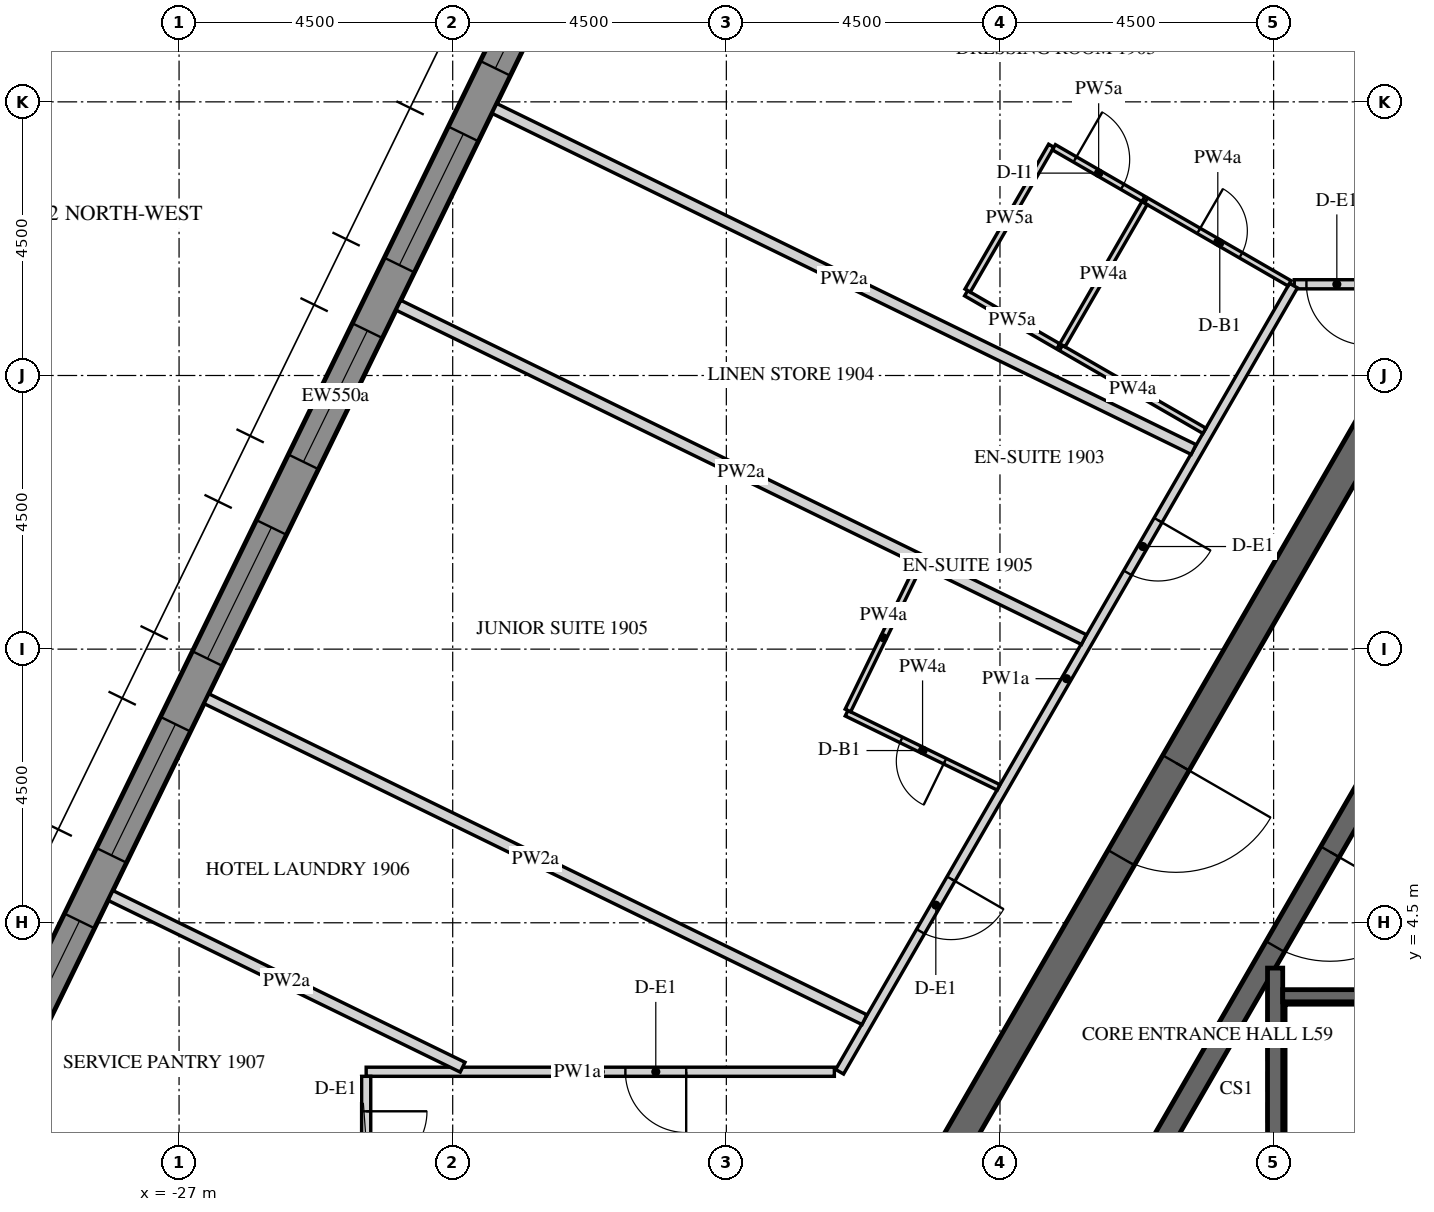
"""IFC4 building model, lengths in metres.
Left out: names, types, materials, properties, quantities, classifications, styles, units other than length and angle.
Written with IfcOpenShell. Run it as: python <this file> out.ifc"""

import sys

from ifc_helpers import new_model, si_unit, direction, frame, frame_2d, origin, place, context, subcontext, project, spatial, polyline, rectangle, outline, extrude, element, fill, save


model = new_model("IFC4")
c1 = context("Model", 3, precision=1e-05, world=origin(), true_north=direction((0.0, 1.0)))
c2 = subcontext(c1, "Body", "Model", "MODEL_VIEW")
j1 = project(units=[si_unit("LENGTHUNIT", "METRE"), si_unit("PLANEANGLEUNIT", "RADIAN")], contexts=[c1])
p1 = place(None, origin())
s1 = spatial("IfcSite", under=j1, at=p1, CompositionType="ELEMENT")
p2 = place(p1, origin())
s2 = spatial("IfcBuilding", under=s1, at=p2, CompositionType="ELEMENT")
p3 = place(p2, frame((0.0, 0.0, 246.3)))
s3 = spatial("IfcBuildingStorey", under=s2, at=p3, CompositionType="ELEMENT", Elevation=246.3)
p4 = place(p3, frame((-18.345, 25.633, -0.15), z_axis=(0.0, 0.0, 1.0), x_axis=(-0.43837181828, -0.898793718791, 0.0)))
e1 = element("IfcWall", 1, at=p4, inside=s3, PredefinedType="SOLIDWALL", context=c2, shape_type="SweptSolid", body=[
    extrude(outline(polyline([(-0.026, -0.275), (27.78, -0.275), (27.735, 0.275), (0.026, 0.275), (-0.026, -0.275)])), origin(), (0.0, 0.0, 1.0), 3.75),
])
p5 = place(p4, frame((1.879, 0.0, 1.05)))
e2 = element("IfcOpeningElement", 2, at=p5, cuts=e1, PredefinedType="OPENING", context=c2, shape_type="SweptSolid", body=[
    extrude(rectangle(XDim=2.4, YDim=2.4, at=frame_2d((1.2, 1.2))), frame((0.0, 0.285, 0.0), z_axis=(0.0, -1.0, 0.0), x_axis=(1.0, 0.0, 0.0)), (0.0, 0.0, 1.0), 0.57),
])
p6 = place(p4, frame((5.479, 0.0, 1.05)))
e3 = element("IfcOpeningElement", 3, at=p6, cuts=e1, PredefinedType="OPENING", context=c2, shape_type="SweptSolid", body=[
    extrude(rectangle(XDim=2.4, YDim=2.4, at=frame_2d((1.2, 1.2))), frame((0.0, 0.285, 0.0), z_axis=(0.0, -1.0, 0.0), x_axis=(1.0, 0.0, 0.0)), (0.0, 0.0, 1.0), 0.57),
])
p7 = place(p4, frame((9.079, 0.0, 1.05)))
e4 = element("IfcOpeningElement", 4, at=p7, cuts=e1, PredefinedType="OPENING", context=c2, shape_type="SweptSolid", body=[
    extrude(rectangle(XDim=2.4, YDim=2.4, at=frame_2d((1.2, 1.2))), frame((0.0, 0.285, 0.0), z_axis=(0.0, -1.0, 0.0), x_axis=(1.0, 0.0, 0.0)), (0.0, 0.0, 1.0), 0.57),
])
p8 = place(p4, frame((12.679, 0.0, 1.05)))
e5 = element("IfcOpeningElement", 5, at=p8, cuts=e1, PredefinedType="OPENING", context=c2, shape_type="SweptSolid", body=[
    extrude(rectangle(XDim=2.4, YDim=2.4, at=frame_2d((1.2, 1.2))), frame((0.0, 0.285, 0.0), z_axis=(0.0, -1.0, 0.0), x_axis=(1.0, 0.0, 0.0)), (0.0, 0.0, 1.0), 0.57),
])
p9 = place(p4, frame((16.279, 0.0, 1.05)))
e6 = element("IfcOpeningElement", 6, at=p9, cuts=e1, PredefinedType="OPENING", context=c2, shape_type="SweptSolid", body=[
    extrude(rectangle(XDim=2.4, YDim=2.4, at=frame_2d((1.2, 1.2))), frame((0.0, 0.285, 0.0), z_axis=(0.0, -1.0, 0.0), x_axis=(1.0, 0.0, 0.0)), (0.0, 0.0, 1.0), 0.57),
])
p10 = place(p4, frame((19.879, 0.0, 1.05)))
e7 = element("IfcOpeningElement", 7, at=p10, cuts=e1, PredefinedType="OPENING", context=c2, shape_type="SweptSolid", body=[
    extrude(rectangle(XDim=2.4, YDim=2.4, at=frame_2d((1.2, 1.2))), frame((0.0, 0.285, 0.0), z_axis=(0.0, -1.0, 0.0), x_axis=(1.0, 0.0, 0.0)), (0.0, 0.0, 1.0), 0.57),
])
p11 = place(p4, frame((23.479, 0.0, 1.05)))
e8 = element("IfcOpeningElement", 8, at=p11, cuts=e1, PredefinedType="OPENING", context=c2, shape_type="SweptSolid", body=[
    extrude(rectangle(XDim=2.4, YDim=2.4, at=frame_2d((1.2, 1.2))), frame((0.0, 0.285, 0.0), z_axis=(0.0, -1.0, 0.0), x_axis=(1.0, 0.0, 0.0)), (0.0, 0.0, 1.0), 0.57),
])
p12 = place(p3, frame((-7.361, 12.75, -0.15), z_axis=(0.0, 0.0, 1.0), x_axis=(-0.50000571537, -0.866022103989, 0.0)))
e9 = element("IfcWall", 9, at=p12, inside=s3, PredefinedType="SHEAR", context=c2, shape_type="SweptSolid", body=[
    extrude(outline(polyline([(-0.144, -0.25), (14.867, -0.25), (14.578, 0.25), (0.144, 0.25), (-0.144, -0.25)])), origin(), (0.0, 0.0, 1.0), 3.75),
])
p13 = place(p12, frame((6.49, 0.0, 0.15)))
e10 = element("IfcOpeningElement", 10, at=p13, cuts=e9, PredefinedType="OPENING", context=c2, shape_type="SweptSolid", body=[
    extrude(rectangle(XDim=1.8, YDim=2.4, at=frame_2d((0.9, 1.2))), frame((0.0, 0.26, 0.0), z_axis=(0.0, -1.0, 0.0), x_axis=(1.0, 0.0, 0.0)), (0.0, 0.0, 1.0), 0.52),
])
p14 = place(p3, frame((-5.673, 9.825, -0.15), z_axis=(0.0, 0.0, 1.0), x_axis=(-0.499995046907, -0.866028263435, 0.0)))
e11 = element("IfcWall", 11, at=p14, inside=s3, PredefinedType="SHEAR", context=c2, shape_type="SweptSolid", body=[
    extrude(outline(polyline([(-0.101, -0.175), (11.446, -0.175), (11.244, 0.175), (0.101, 0.175), (-0.101, -0.175)])), origin(), (0.0, 0.0, 1.0), 3.75),
])
p15 = place(p14, frame((4.801, 0.0, 0.15)))
e12 = element("IfcOpeningElement", 12, at=p15, cuts=e11, PredefinedType="OPENING", context=c2, shape_type="SweptSolid", body=[
    extrude(rectangle(XDim=1.8, YDim=2.4, at=frame_2d((0.9, 1.2))), frame((0.0, 0.185, 0.0), z_axis=(0.0, -1.0, 0.0), x_axis=(1.0, 0.0, 0.0)), (0.0, 0.0, 1.0), 0.37),
])
p16 = place(p3, frame((-8.975, -3.755, -0.25), z_axis=(0.0, 0.0, 1.0), x_axis=(0.0, 1.0, 0.0)))
e13 = element("IfcWall", 13, at=p16, inside=s3, PredefinedType="SHEAR", context=c2, shape_type="SweptSolid", body=[
    extrude(rectangle(XDim=7.51, YDim=0.25, at=frame_2d((3.755, 0.0))), origin(), (0.0, 0.0, 1.0), 3.9),
])
p17 = place(p3, frame((-8.85, 3.3, -0.25), z_axis=(0.0, 0.0, 1.0), x_axis=(1.0, 0.0, 0.0)))
e14 = element("IfcWall", 14, at=p17, inside=s3, PredefinedType="SHEAR", context=c2, shape_type="SweptSolid", body=[
    extrude(rectangle(XDim=2.95, YDim=0.2, at=frame_2d((1.475, 0.0))), origin(), (0.0, 0.0, 1.0), 3.9),
])
p18 = place(p3, frame((4.207, 15.0, 0.0), z_axis=(0.0, 0.0, 1.0), x_axis=(-1.0, 0.0, 0.0)))
e15 = element("IfcWall", 15, at=p18, inside=s3, PredefinedType="PARTITIONING", context=c2, shape_type="SweptSolid", body=[
    extrude(rectangle(XDim=12.867, YDim=0.15, at=frame_2d((6.434, 0.0))), origin(), (0.0, 0.0, 1.0), 2.838),
])
p19 = place(p18, frame((6.025, 0.0, 0.0)))
e16 = element("IfcOpeningElement", 16, at=p19, cuts=e15, PredefinedType="OPENING", context=c2, shape_type="SweptSolid", body=[
    extrude(rectangle(XDim=1.0, YDim=2.1, at=frame_2d((0.5, 1.05))), frame((0.0, 0.085, 0.0), z_axis=(0.0, -1.0, 0.0), x_axis=(1.0, 0.0, 0.0)), (0.0, 0.0, 1.0), 0.17),
])
p20 = place(p18, frame((11.667, 0.0, 0.0)))
e17 = element("IfcOpeningElement", 17, at=p20, cuts=e15, PredefinedType="OPENING", context=c2, shape_type="SweptSolid", body=[
    extrude(rectangle(XDim=1.0, YDim=2.1, at=frame_2d((0.5, 1.05))), frame((0.0, 0.085, 0.0), z_axis=(0.0, -1.0, 0.0), x_axis=(1.0, 0.0, 0.0)), (0.0, 0.0, 1.0), 0.17),
])
p21 = place(p3, frame((-8.673, 14.978, 0.0), z_axis=(0.0, 0.0, 1.0), x_axis=(-0.50000700621, -0.86602135871, 0.0)))
e18 = element("IfcWall", 18, at=p21, inside=s3, PredefinedType="PARTITIONING", context=c2, shape_type="SweptSolid", body=[
    extrude(rectangle(XDim=14.928, YDim=0.15, at=frame_2d((7.464, 0.0))), origin(), (0.0, 0.0, 1.0), 2.838),
])
p22 = place(p21, frame((4.454, 0.0, 0.0)))
e19 = element("IfcOpeningElement", 19, at=p22, cuts=e18, PredefinedType="OPENING", context=c2, shape_type="SweptSolid", body=[
    extrude(rectangle(XDim=1.0, YDim=2.1, at=frame_2d((0.5, 1.05))), frame((0.0, 0.085, 0.0), z_axis=(0.0, -1.0, 0.0), x_axis=(1.0, 0.0, 0.0)), (0.0, 0.0, 1.0), 0.17),
])
p23 = place(p21, frame((11.264, 0.0, 0.0)))
e20 = element("IfcOpeningElement", 20, at=p23, cuts=e18, PredefinedType="OPENING", context=c2, shape_type="SweptSolid", body=[
    extrude(rectangle(XDim=1.0, YDim=2.1, at=frame_2d((0.5, 1.05))), frame((0.0, 0.085, 0.0), z_axis=(0.0, -1.0, 0.0), x_axis=(1.0, 0.0, 0.0)), (0.0, 0.0, 1.0), 0.17),
])
p24 = place(p3, frame((-16.224, 2.05, 0.0), z_axis=(0.0, 0.0, 1.0), x_axis=(-1.0, 0.0, 0.0)))
e21 = element("IfcWall", 21, at=p24, inside=s3, PredefinedType="PARTITIONING", context=c2, shape_type="SweptSolid", body=[
    extrude(rectangle(XDim=7.699, YDim=0.15, at=frame_2d((3.85, 0.0))), origin(), (0.0, 0.0, 1.0), 2.838),
])
p25 = place(p24, frame((2.437, 0.0, 0.0)))
e22 = element("IfcOpeningElement", 22, at=p25, cuts=e21, PredefinedType="OPENING", context=c2, shape_type="SweptSolid", body=[
    extrude(rectangle(XDim=1.0, YDim=2.1, at=frame_2d((0.5, 1.05))), frame((0.0, 0.085, 0.0), z_axis=(0.0, -1.0, 0.0), x_axis=(1.0, 0.0, 0.0)), (0.0, 0.0, 1.0), 0.17),
])
p26 = place(p3, frame((-23.923, 1.975, 0.0), z_axis=(0.0, 0.0, 1.0), x_axis=(0.0, -1.0, 0.0)))
e23 = element("IfcWall", 23, at=p26, inside=s3, PredefinedType="PARTITIONING", context=c2, shape_type="SweptSolid", body=[
    extrude(rectangle(XDim=1.725, YDim=0.15, at=frame_2d((0.863, 0.0))), origin(), (0.0, 0.0, 1.0), 2.838),
])
p27 = place(p26, frame((0.575, 0.0, 0.0)))
e24 = element("IfcOpeningElement", 24, at=p27, cuts=e23, PredefinedType="OPENING", context=c2, shape_type="SweptSolid", body=[
    extrude(rectangle(XDim=1.0, YDim=2.1, at=frame_2d((0.5, 1.05))), frame((0.0, 0.085, 0.0), z_axis=(0.0, -1.0, 0.0), x_axis=(1.0, 0.0, 0.0)), (0.0, 0.0, 1.0), 0.17),
])
p28 = place(p3, frame((-10.138, 12.591, 0.0), z_axis=(0.0, 0.0, 1.0), x_axis=(-0.866051307416, 0.49995513091, 0.0)))
e25 = element("IfcWall", 25, at=p28, inside=s3, PredefinedType="PARTITIONING", context=c2, shape_type="SweptSolid", body=[
    extrude(rectangle(XDim=2.725, YDim=0.1, at=frame_2d((1.362, 0.0))), origin(), (0.0, 0.0, 1.0), 2.838),
])
p29 = place(p3, frame((-11.098, 16.378, 0.0), z_axis=(0.0, 0.0, 1.0), x_axis=(0.866012511928, -0.500022328685, 0.0)))
e26 = element("IfcWall", 26, at=p29, inside=s3, PredefinedType="PARTITIONING", context=c2, shape_type="SweptSolid", body=[
    extrude(rectangle(XDim=2.725, YDim=0.1, at=frame_2d((1.363, 0.0))), origin(), (0.0, 0.0, 1.0), 2.838),
])
p30 = place(p29, frame((1.0, 0.0, 0.0)))
e27 = element("IfcOpeningElement", 27, at=p30, cuts=e26, PredefinedType="OPENING", context=c2, shape_type="SweptSolid", body=[
    extrude(rectangle(XDim=0.8, YDim=2.1, at=frame_2d((0.4, 1.05))), frame((0.0, 0.06, 0.0), z_axis=(0.0, -1.0, 0.0), x_axis=(1.0, 0.0, 0.0)), (0.0, 0.0, 1.0), 0.12),
])
p31 = place(p3, frame((-12.541, 13.978, 0.0), z_axis=(0.0, 0.0, 1.0), x_axis=(-0.866036909293, 0.499980071345, 0.0)))
e28 = element("IfcWall", 28, at=p31, inside=s3, PredefinedType="PARTITIONING", context=c2, shape_type="SweptSolid", body=[
    extrude(rectangle(XDim=1.75, YDim=0.1, at=frame_2d((0.875, 0.0))), origin(), (0.0, 0.0, 1.0), 2.838),
])
p32 = place(p3, frame((-14.031, 14.896, 0.0), z_axis=(0.0, 0.0, 1.0), x_axis=(0.499996545922, 0.866027397988, 0.0)))
e29 = element("IfcWall", 29, at=p32, inside=s3, PredefinedType="PARTITIONING", context=c2, shape_type="SweptSolid", body=[
    extrude(rectangle(XDim=2.75, YDim=0.1, at=frame_2d((1.375, 0.0))), origin(), (0.0, 0.0, 1.0), 2.838),
])
p33 = place(p3, frame((-12.613, 17.253, 0.0), z_axis=(0.0, 0.0, 1.0), x_axis=(0.865989465428, -0.500062241894, 0.0)))
e30 = element("IfcWall", 30, at=p33, inside=s3, PredefinedType="PARTITIONING", context=c2, shape_type="SweptSolid", body=[
    extrude(rectangle(XDim=1.7, YDim=0.1, at=frame_2d((0.85, 0.0))), origin(), (0.0, 0.0, 1.0), 2.838),
])
p34 = place(p33, frame((0.4, 0.0, 0.0)))
e31 = element("IfcOpeningElement", 31, at=p34, cuts=e30, PredefinedType="OPENING", context=c2, shape_type="SweptSolid", body=[
    extrude(rectangle(XDim=0.9, YDim=2.1, at=frame_2d((0.45, 1.05))), frame((0.0, 0.06, 0.0), z_axis=(0.0, -1.0, 0.0), x_axis=(1.0, 0.0, 0.0)), (0.0, 0.0, 1.0), 0.12),
])
p35 = place(p3, frame((-21.815, 17.892, 0.0), z_axis=(0.0, 0.0, 1.0), x_axis=(0.898799253997, -0.438360469265, 0.0)))
e32 = element("IfcWall", 32, at=p35, inside=s3, PredefinedType="PARTITIONING", context=c2, shape_type="SweptSolid", body=[
    extrude(rectangle(XDim=12.794, YDim=0.18, at=frame_2d((6.397, 0.0))), origin(), (0.0, 0.0, 1.0), 2.838),
])
p36 = place(p3, frame((-11.123, 16.335, 0.0), z_axis=(0.0, 0.0, 1.0), x_axis=(-0.499980770555, -0.866036505625, 0.0)))
e33 = element("IfcWall", 33, at=p36, inside=s3, PredefinedType="PARTITIONING", context=c2, shape_type="SweptSolid", body=[
    extrude(rectangle(XDim=2.7, YDim=0.1, at=frame_2d((1.35, 0.0))), origin(), (0.0, 0.0, 1.0), 2.838),
])
p37 = place(p3, frame((-23.393, 14.656, 0.0), z_axis=(0.0, 0.0, 1.0), x_axis=(0.898790706576, -0.43837799417, 0.0)))
e34 = element("IfcWall", 34, at=p37, inside=s3, PredefinedType="PARTITIONING", context=c2, shape_type="SweptSolid", body=[
    extrude(rectangle(XDim=12.542, YDim=0.18, at=frame_2d((6.271, 0.0))), origin(), (0.0, 0.0, 1.0), 2.838),
])
p38 = place(p3, frame((-13.523, 6.727, 0.0), z_axis=(0.0, 0.0, 1.0), x_axis=(-0.89880809785, 0.438342335668, 0.0)))
e35 = element("IfcWall", 35, at=p38, inside=s3, PredefinedType="PARTITIONING", context=c2, shape_type="SweptSolid", body=[
    extrude(rectangle(XDim=2.781, YDim=0.1, at=frame_2d((1.391, 0.0))), origin(), (0.0, 0.0, 1.0), 2.838),
])
p39 = place(p38, frame((0.981, 0.0, 0.0)))
e36 = element("IfcOpeningElement", 36, at=p39, cuts=e35, PredefinedType="OPENING", context=c2, shape_type="SweptSolid", body=[
    extrude(rectangle(XDim=0.8, YDim=2.1, at=frame_2d((0.4, 1.05))), frame((0.0, 0.06, 0.0), z_axis=(0.0, -1.0, 0.0), x_axis=(1.0, 0.0, 0.0)), (0.0, 0.0, 1.0), 0.12),
])
p40 = place(p3, frame((-16.001, 7.991, 0.0), z_axis=(0.0, 0.0, 1.0), x_axis=(0.438344066549, 0.89880725371, 0.0)))
e37 = element("IfcWall", 37, at=p40, inside=s3, PredefinedType="PARTITIONING", context=c2, shape_type="SweptSolid", body=[
    extrude(rectangle(XDim=2.66, YDim=0.1, at=frame_2d((1.33, 0.0))), origin(), (0.0, 0.0, 1.0), 2.838),
])
p41 = place(p3, frame((-26.549, 8.185, 0.0), z_axis=(0.0, 0.0, 1.0), x_axis=(0.8987965099, -0.438366095623, 0.0)))
e38 = element("IfcWall", 38, at=p41, inside=s3, PredefinedType="PARTITIONING", context=c2, shape_type="SweptSolid", body=[
    extrude(rectangle(XDim=12.039, YDim=0.18, at=frame_2d((6.019, 0.0))), origin(), (0.0, 0.0, 1.0), 2.838),
])
p42 = place(p3, frame((-28.127, 4.949, 0.0), z_axis=(0.0, 0.0, 1.0), x_axis=(0.898795032868, -0.438369124017, 0.0)))
e39 = element("IfcWall", 39, at=p42, inside=s3, PredefinedType="PARTITIONING", context=c2, shape_type="SweptSolid", body=[
    extrude(rectangle(XDim=6.442, YDim=0.18, at=frame_2d((3.221, 0.0))), origin(), (0.0, 0.0, 1.0), 2.838),
])
p43 = place(p6, frame((0.0, 0.205, 0.0)))
e40 = element("IfcWindow", 40, at=p43, inside=s3, PartitioningType="DOUBLE_PANEL_VERTICAL", PredefinedType="WINDOW", context=c2, shape_type="SweptSolid", body=[
    extrude(rectangle(XDim=2.4, YDim=2.4, at=frame_2d((1.2, 1.2))), frame((0.0, 0.03, 0.0), z_axis=(0.0, -1.0, 0.0), x_axis=(1.0, 0.0, 0.0)), (0.0, 0.0, 1.0), 0.06),
])
fill(e3, e40)
p44 = place(p7, frame((0.0, 0.205, 0.0)))
e41 = element("IfcWindow", 41, at=p44, inside=s3, PartitioningType="DOUBLE_PANEL_VERTICAL", PredefinedType="WINDOW", context=c2, shape_type="SweptSolid", body=[
    extrude(rectangle(XDim=2.4, YDim=2.4, at=frame_2d((1.2, 1.2))), frame((0.0, 0.03, 0.0), z_axis=(0.0, -1.0, 0.0), x_axis=(1.0, 0.0, 0.0)), (0.0, 0.0, 1.0), 0.06),
])
fill(e4, e41)
p45 = place(p8, frame((0.0, 0.205, 0.0)))
e42 = element("IfcWindow", 42, at=p45, inside=s3, PartitioningType="DOUBLE_PANEL_VERTICAL", PredefinedType="WINDOW", context=c2, shape_type="SweptSolid", body=[
    extrude(rectangle(XDim=2.4, YDim=2.4, at=frame_2d((1.2, 1.2))), frame((0.0, 0.03, 0.0), z_axis=(0.0, -1.0, 0.0), x_axis=(1.0, 0.0, 0.0)), (0.0, 0.0, 1.0), 0.06),
])
fill(e5, e42)
p46 = place(p9, frame((0.0, 0.205, 0.0)))
e43 = element("IfcWindow", 43, at=p46, inside=s3, PartitioningType="DOUBLE_PANEL_VERTICAL", PredefinedType="WINDOW", context=c2, shape_type="SweptSolid", body=[
    extrude(rectangle(XDim=2.4, YDim=2.4, at=frame_2d((1.2, 1.2))), frame((0.0, 0.03, 0.0), z_axis=(0.0, -1.0, 0.0), x_axis=(1.0, 0.0, 0.0)), (0.0, 0.0, 1.0), 0.06),
])
fill(e6, e43)
p47 = place(p10, frame((0.0, 0.205, 0.0)))
e44 = element("IfcWindow", 44, at=p47, inside=s3, PartitioningType="DOUBLE_PANEL_VERTICAL", PredefinedType="WINDOW", context=c2, shape_type="SweptSolid", body=[
    extrude(rectangle(XDim=2.4, YDim=2.4, at=frame_2d((1.2, 1.2))), frame((0.0, 0.03, 0.0), z_axis=(0.0, -1.0, 0.0), x_axis=(1.0, 0.0, 0.0)), (0.0, 0.0, 1.0), 0.06),
])
fill(e7, e44)
p48 = place(p11, frame((0.0, 0.205, 0.0)))
e45 = element("IfcWindow", 45, at=p48, inside=s3, PartitioningType="DOUBLE_PANEL_VERTICAL", PredefinedType="WINDOW", context=c2, shape_type="SweptSolid", body=[
    extrude(rectangle(XDim=2.4, YDim=2.4, at=frame_2d((1.2, 1.2))), frame((0.0, 0.03, 0.0), z_axis=(0.0, -1.0, 0.0), x_axis=(1.0, 0.0, 0.0)), (0.0, 0.0, 1.0), 0.06),
])
fill(e8, e45)
p49 = place(p13, origin())
e46 = element("IfcDoor", 46, at=p49, inside=s3, OperationType="DOUBLE_DOOR_SINGLE_SWING", PredefinedType="DOOR", context=c2, shape_type="SweptSolid", body=[
    extrude(rectangle(XDim=1.8, YDim=2.4, at=frame_2d((0.9, 1.2))), frame((0.0, 0.025, 0.0), z_axis=(0.0, -1.0, 0.0), x_axis=(1.0, 0.0, 0.0)), (0.0, 0.0, 1.0), 0.05),
])
fill(e10, e46)
p50 = place(p15, origin())
e47 = element("IfcDoor", 47, at=p50, inside=s3, OperationType="DOUBLE_DOOR_SINGLE_SWING", PredefinedType="DOOR", context=c2, shape_type="SweptSolid", body=[
    extrude(rectangle(XDim=1.8, YDim=2.4, at=frame_2d((0.9, 1.2))), frame((0.0, 0.025, 0.0), z_axis=(0.0, -1.0, 0.0), x_axis=(1.0, 0.0, 0.0)), (0.0, 0.0, 1.0), 0.05),
])
fill(e12, e47)
p51 = place(p20, origin())
e48 = element("IfcDoor", 48, at=p51, inside=s3, OperationType="SINGLE_SWING_LEFT", PredefinedType="DOOR", context=c2, shape_type="SweptSolid", body=[
    extrude(rectangle(XDim=1.0, YDim=2.1, at=frame_2d((0.5, 1.05))), frame((0.0, 0.025, 0.0), z_axis=(0.0, -1.0, 0.0), x_axis=(1.0, 0.0, 0.0)), (0.0, 0.0, 1.0), 0.05),
])
fill(e17, e48)
p52 = place(p30, origin())
e49 = element("IfcDoor", 49, at=p52, inside=s3, OperationType="SINGLE_SWING_LEFT", PredefinedType="DOOR", context=c2, shape_type="SweptSolid", body=[
    extrude(rectangle(XDim=0.8, YDim=2.1, at=frame_2d((0.4, 1.05))), frame((0.0, 0.025, 0.0), z_axis=(0.0, -1.0, 0.0), x_axis=(1.0, 0.0, 0.0)), (0.0, 0.0, 1.0), 0.05),
])
fill(e27, e49)
p53 = place(p34, origin())
e50 = element("IfcDoor", 50, at=p53, inside=s3, OperationType="SINGLE_SWING_LEFT", PredefinedType="DOOR", context=c2, shape_type="SweptSolid", body=[
    extrude(rectangle(XDim=0.9, YDim=2.1, at=frame_2d((0.45, 1.05))), frame((0.0, 0.025, 0.0), z_axis=(0.0, -1.0, 0.0), x_axis=(1.0, 0.0, 0.0)), (0.0, 0.0, 1.0), 0.05),
])
fill(e31, e50)
p54 = place(p22, origin())
e51 = element("IfcDoor", 51, at=p54, inside=s3, OperationType="SINGLE_SWING_LEFT", PredefinedType="DOOR", context=c2, shape_type="SweptSolid", body=[
    extrude(rectangle(XDim=1.0, YDim=2.1, at=frame_2d((0.5, 1.05))), frame((0.0, 0.025, 0.0), z_axis=(0.0, -1.0, 0.0), x_axis=(1.0, 0.0, 0.0)), (0.0, 0.0, 1.0), 0.05),
])
fill(e19, e51)
p55 = place(p23, origin())
e52 = element("IfcDoor", 52, at=p55, inside=s3, OperationType="SINGLE_SWING_LEFT", PredefinedType="DOOR", context=c2, shape_type="SweptSolid", body=[
    extrude(rectangle(XDim=1.0, YDim=2.1, at=frame_2d((0.5, 1.05))), frame((0.0, 0.025, 0.0), z_axis=(0.0, -1.0, 0.0), x_axis=(1.0, 0.0, 0.0)), (0.0, 0.0, 1.0), 0.05),
])
fill(e20, e52)
p56 = place(p39, origin())
e53 = element("IfcDoor", 53, at=p56, inside=s3, OperationType="SINGLE_SWING_RIGHT", PredefinedType="DOOR", context=c2, shape_type="SweptSolid", body=[
    extrude(rectangle(XDim=0.8, YDim=2.1, at=frame_2d((0.4, 1.05))), frame((0.0, 0.025, 0.0), z_axis=(0.0, -1.0, 0.0), x_axis=(1.0, 0.0, 0.0)), (0.0, 0.0, 1.0), 0.05),
])
fill(e36, e53)
p57 = place(p25, origin())
e54 = element("IfcDoor", 54, at=p57, inside=s3, OperationType="SINGLE_SWING_RIGHT", PredefinedType="DOOR", context=c2, shape_type="SweptSolid", body=[
    extrude(rectangle(XDim=1.0, YDim=2.1, at=frame_2d((0.5, 1.05))), frame((0.0, 0.025, 0.0), z_axis=(0.0, -1.0, 0.0), x_axis=(1.0, 0.0, 0.0)), (0.0, 0.0, 1.0), 0.05),
])
fill(e22, e54)
p58 = place(p27, origin())
e55 = element("IfcDoor", 55, at=p58, inside=s3, OperationType="SINGLE_SWING_LEFT", PredefinedType="DOOR", context=c2, shape_type="SweptSolid", body=[
    extrude(rectangle(XDim=1.0, YDim=2.1, at=frame_2d((0.5, 1.05))), frame((0.0, 0.025, 0.0), z_axis=(0.0, -1.0, 0.0), x_axis=(1.0, 0.0, 0.0)), (0.0, 0.0, 1.0), 0.05),
])
fill(e24, e55)
save(model, sys.argv[1])
